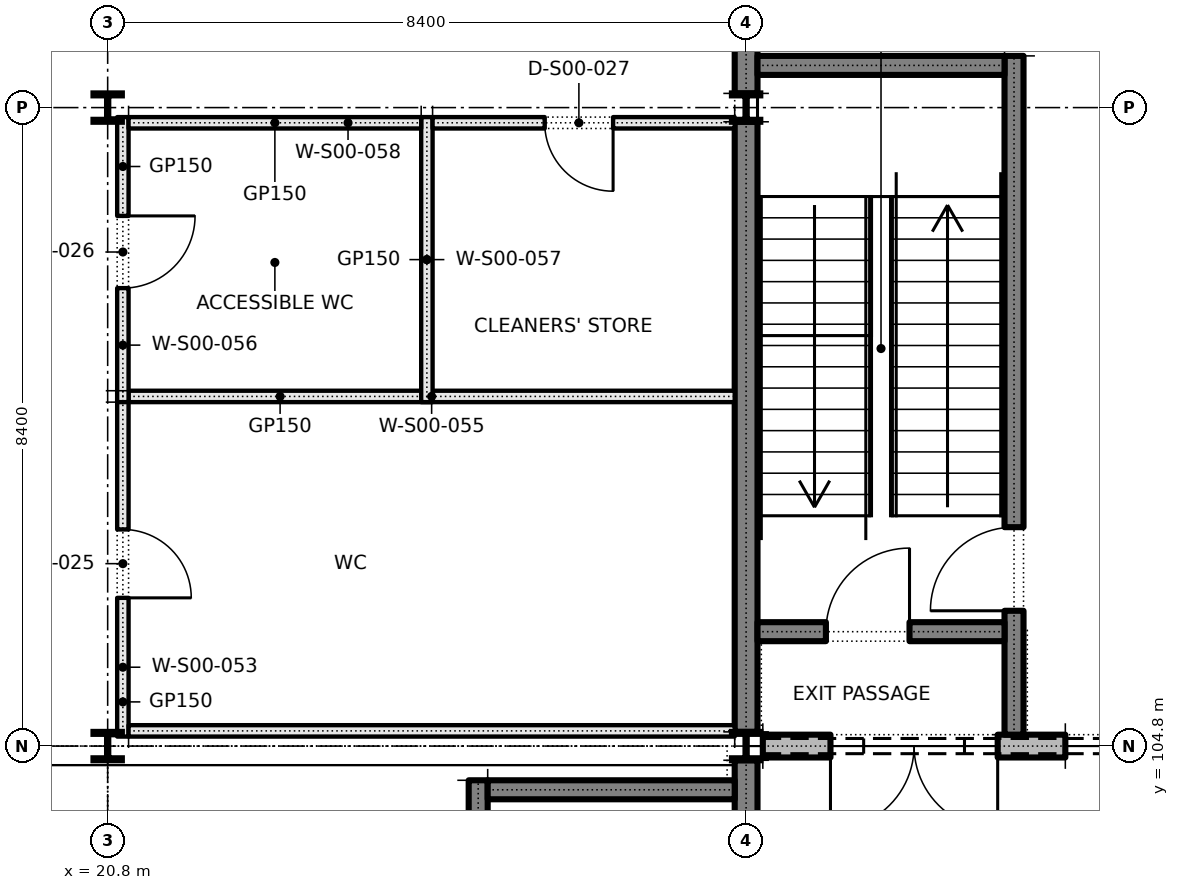
"""IFC4 building model, lengths in metres.
Left out: names, types, materials, properties, quantities, classifications, styles, units other than length and angle.
Written with IfcOpenShell. Run it as: python <this file> out.ifc"""

import sys

from ifc_helpers import new_model, si_unit, direction, frame, frame_2d, origin, origin_2d, place, context, subcontext, project, spatial, rectangle, i_section, extrude, element, fill, save


model = new_model("IFC4")
c1 = context("Model", 3, precision=1e-05, world=origin(), true_north=direction((0.0, 1.0)))
c2 = subcontext(c1, "Body", "Model", "MODEL_VIEW")
j1 = project(units=[si_unit("LENGTHUNIT", "METRE"), si_unit("PLANEANGLEUNIT", "RADIAN")], contexts=[c1])
p1 = place(None, origin())
s1 = spatial("IfcSite", under=j1, at=p1, CompositionType="ELEMENT")
p2 = place(p1, origin())
s2 = spatial("IfcBuilding", under=s1, at=p2, CompositionType="ELEMENT")
p3 = place(p2, origin())
s3 = spatial("IfcBuildingStorey", under=s2, at=p3, CompositionType="ELEMENT", Elevation=0.0)
for number, where, z_axis, x_axis in (
    (1, (20.8, 104.8, 0.0), (0.0, 0.0, 1.0), (1.0, 0.0, 0.0)),
    (2, (20.8, 113.2, 0.0), (0.0, 0.0, 1.0), (1.0, 0.0, 0.0)),
    (3, (29.2, 104.8, 0.0), (0.0, 0.0, 1.0), (1.0, 0.0, 0.0)),
    (4, (29.2, 113.2, 0.0), (0.0, 0.0, 1.0), (1.0, 0.0, 0.0)),
):
    element("IfcColumn", number, at=place(p3, frame(where, z_axis=z_axis, x_axis=x_axis)), inside=s3, PredefinedType="COLUMN", context=c2, shape_type="SweptSolid", body=[
        extrude(i_section(OverallWidth=0.373, OverallDepth=0.373, WebThickness=0.016, FlangeThickness=0.026, FilletRadius=0.015, at=origin_2d()), origin(), (0.0, 0.0, 1.0), 5.4),
    ])
p4 = place(p3, frame((29.2, 96.65, 0.0), z_axis=(0.0, 0.0, 1.0), x_axis=(0.0, 1.0, 0.0)))
e5 = element("IfcWall", 5, at=p4, inside=s3, PredefinedType="SOLIDWALL", context=c2, shape_type="SweptSolid", body=[
    extrude(rectangle(XDim=7.963, YDim=0.3, at=frame_2d((3.982, 0.0))), origin(), (0.0, 0.0, 1.0), 5.4),
])
p5 = place(p4, frame((0.55, 0.0, 0.0)))
e6 = element("IfcOpeningElement", 6, at=p5, cuts=e5, PredefinedType="OPENING", context=c2, shape_type="SweptSolid", body=[
    extrude(rectangle(XDim=1.1, YDim=2.1, at=frame_2d((0.55, 1.05))), frame((0.0, 0.16, 0.0), z_axis=(0.0, -1.0, 0.0), x_axis=(1.0, 0.0, 0.0)), (0.0, 0.0, 1.0), 0.32),
])
p6 = place(p3, frame((29.2, 104.987, 0.0), z_axis=(0.0, 0.0, 1.0), x_axis=(0.0, 1.0, 0.0)))
e7 = element("IfcWall", 7, at=p6, inside=s3, PredefinedType="SOLIDWALL", context=c2, shape_type="SweptSolid", body=[
    extrude(rectangle(XDim=8.027, YDim=0.3, at=frame_2d((4.013, 0.0))), origin(), (0.0, 0.0, 1.0), 5.4),
])
p7 = place(p3, frame((29.2, 113.387, 0.0), z_axis=(0.0, 0.0, 1.0), x_axis=(0.0, 1.0, 0.0)))
e8 = element("IfcWall", 8, at=p7, inside=s3, PredefinedType="SOLIDWALL", context=c2, shape_type="SweptSolid", body=[
    extrude(rectangle(XDim=8.027, YDim=0.3, at=frame_2d((4.013, 0.0))), origin(), (0.0, 0.0, 1.0), 5.4),
])
p8 = place(p7, frame((3.113, 0.0, 0.0)))
e9 = element("IfcOpeningElement", 9, at=p8, cuts=e8, PredefinedType="OPENING", context=c2, shape_type="SweptSolid", body=[
    extrude(rectangle(XDim=1.8, YDim=2.4, at=frame_2d((0.9, 1.2))), frame((0.0, 0.16, 0.0), z_axis=(0.0, -1.0, 0.0), x_axis=(1.0, 0.0, 0.0)), (0.0, 0.0, 1.0), 0.32),
])
p9 = place(p3, frame((29.42, 104.8, 0.0), z_axis=(0.0, 0.0, 1.0), x_axis=(1.0, 0.0, 0.0)))
e10 = element("IfcWall", 10, at=p9, inside=s3, PredefinedType="SOLIDWALL", context=c2, shape_type="SweptSolid", body=[
    extrude(rectangle(XDim=3.98, YDim=0.3, at=frame_2d((1.99, 0.0))), origin(), (0.0, 0.0, 1.0), 2.7),
])
p10 = place(p9, frame((0.89, 0.0, 0.0)))
e11 = element("IfcOpeningElement", 11, at=p10, cuts=e10, PredefinedType="OPENING", context=c2, shape_type="SweptSolid", body=[
    extrude(rectangle(XDim=2.2, YDim=2.4, at=frame_2d((1.1, 1.2))), frame((0.0, 0.16, 0.0), z_axis=(0.0, -1.0, 0.0), x_axis=(1.0, 0.0, 0.0)), (0.0, 0.0, 1.0), 0.32),
])
p11 = place(p3, frame((25.675, 96.65, 0.0), z_axis=(0.0, 0.0, 1.0), x_axis=(0.0, 1.0, 0.0)))
e12 = element("IfcWall", 12, at=p11, inside=s3, PredefinedType="SHEAR", context=c2, shape_type="SweptSolid", body=[
    extrude(rectangle(XDim=7.7, YDim=0.25, at=frame_2d((3.85, 0.0))), origin(), (0.0, 0.0, 1.0), 5.4),
])
p12 = place(p11, frame((0.4, 0.0, 0.0)))
e13 = element("IfcOpeningElement", 13, at=p12, cuts=e12, PredefinedType="OPENING", context=c2, shape_type="SweptSolid", body=[
    extrude(rectangle(XDim=1.1, YDim=2.1, at=frame_2d((0.55, 1.05))), frame((0.0, 0.135, 0.0), z_axis=(0.0, -1.0, 0.0), x_axis=(1.0, 0.0, 0.0)), (0.0, 0.0, 1.0), 0.27),
])
p13 = place(p3, frame((25.8, 104.225, 0.0), z_axis=(0.0, 0.0, 1.0), x_axis=(1.0, 0.0, 0.0)))
e14 = element("IfcWall", 14, at=p13, inside=s3, PredefinedType="SHEAR", context=c2, shape_type="SweptSolid", body=[
    extrude(rectangle(XDim=3.25, YDim=0.25, at=frame_2d((1.625, 0.0))), origin(), (0.0, 0.0, 1.0), 5.4),
])
p14 = place(p3, frame((21.0, 104.925, 0.0), z_axis=(0.0, 0.0, 1.0), x_axis=(0.0, 1.0, 0.0)))
e15 = element("IfcWall", 15, at=p14, inside=s3, PredefinedType="PARTITIONING", context=c2, shape_type="SweptSolid", body=[
    extrude(rectangle(XDim=4.55, YDim=0.15, at=frame_2d((2.275, 0.0))), origin(), (0.0, 0.0, 1.0), 5.4),
])
p15 = place(p14, frame((1.825, 0.0, 0.0)))
e16 = element("IfcOpeningElement", 16, at=p15, cuts=e15, PredefinedType="OPENING", context=c2, shape_type="SweptSolid", body=[
    extrude(rectangle(XDim=0.9, YDim=2.1, at=frame_2d((0.45, 1.05))), frame((0.0, 0.085, 0.0), z_axis=(0.0, -1.0, 0.0), x_axis=(1.0, 0.0, 0.0)), (0.0, 0.0, 1.0), 0.17),
])
for number, where, z_axis, x_axis in (
    (17, (21.075, 105.0, 0.0), (0.0, 0.0, 1.0), (1.0, 0.0, 0.0)),
    (18, (21.075, 109.4, 0.0), (0.0, 0.0, 1.0), (1.0, 0.0, 0.0)),
):
    element("IfcWall", number, at=place(p3, frame(where, z_axis=z_axis, x_axis=x_axis)), inside=s3, PredefinedType="PARTITIONING", context=c2, shape_type="SweptSolid", body=[
        extrude(rectangle(XDim=7.975, YDim=0.15, at=frame_2d((3.988, 0.0))), origin(), (0.0, 0.0, 1.0), 5.4),
    ])
p16 = place(p3, frame((21.0, 109.325, 0.0), z_axis=(0.0, 0.0, 1.0), x_axis=(0.0, 1.0, 0.0)))
e19 = element("IfcWall", 19, at=p16, inside=s3, PredefinedType="PARTITIONING", context=c2, shape_type="SweptSolid", body=[
    extrude(rectangle(XDim=3.75, YDim=0.15, at=frame_2d((1.875, 0.0))), origin(), (0.0, 0.0, 1.0), 5.4),
])
p17 = place(p16, frame((1.5, 0.0, 0.0)))
e20 = element("IfcOpeningElement", 20, at=p17, cuts=e19, PredefinedType="OPENING", context=c2, shape_type="SweptSolid", body=[
    extrude(rectangle(XDim=0.95, YDim=2.1, at=frame_2d((0.475, 1.05))), frame((0.0, 0.085, 0.0), z_axis=(0.0, -1.0, 0.0), x_axis=(1.0, 0.0, 0.0)), (0.0, 0.0, 1.0), 0.17),
])
p18 = place(p3, frame((25.0, 109.325, 0.0), z_axis=(0.0, 0.0, 1.0), x_axis=(0.0, 1.0, 0.0)))
e21 = element("IfcWall", 21, at=p18, inside=s3, PredefinedType="PARTITIONING", context=c2, shape_type="SweptSolid", body=[
    extrude(rectangle(XDim=3.75, YDim=0.15, at=frame_2d((1.875, 0.0))), origin(), (0.0, 0.0, 1.0), 5.4),
])
p19 = place(p3, frame((21.075, 113.0, 0.0), z_axis=(0.0, 0.0, 1.0), x_axis=(1.0, 0.0, 0.0)))
e22 = element("IfcWall", 22, at=p19, inside=s3, PredefinedType="PARTITIONING", context=c2, shape_type="SweptSolid", body=[
    extrude(rectangle(XDim=3.85, YDim=0.15, at=frame_2d((1.925, 0.0))), origin(), (0.0, 0.0, 1.0), 5.4),
])
p20 = place(p3, frame((25.075, 113.0, 0.0), z_axis=(0.0, 0.0, 1.0), x_axis=(1.0, 0.0, 0.0)))
e23 = element("IfcWall", 23, at=p20, inside=s3, PredefinedType="PARTITIONING", context=c2, shape_type="SweptSolid", body=[
    extrude(rectangle(XDim=3.975, YDim=0.15, at=frame_2d((1.988, 0.0))), origin(), (0.0, 0.0, 1.0), 5.4),
])
p21 = place(p20, frame((1.475, 0.0, 0.0)))
e24 = element("IfcOpeningElement", 24, at=p21, cuts=e23, PredefinedType="OPENING", context=c2, shape_type="SweptSolid", body=[
    extrude(rectangle(XDim=0.9, YDim=2.1, at=frame_2d((0.45, 1.05))), frame((0.0, 0.085, 0.0), z_axis=(0.0, -1.0, 0.0), x_axis=(1.0, 0.0, 0.0)), (0.0, 0.0, 1.0), 0.17),
])
p22 = place(p3, frame((32.725, 104.95, 0.0), z_axis=(0.0, 0.0, 1.0), x_axis=(0.0, 1.0, 0.0)))
e25 = element("IfcWall", 25, at=p22, inside=s3, PredefinedType="SHEAR", context=c2, shape_type="SweptSolid", body=[
    extrude(rectangle(XDim=8.93, YDim=0.25, at=frame_2d((4.465, 0.0))), origin(), (0.0, 0.0, 1.0), 5.4),
])
p23 = place(p22, frame((1.63, 0.0, 0.0)))
e26 = element("IfcOpeningElement", 26, at=p23, cuts=e25, PredefinedType="OPENING", context=c2, shape_type="SweptSolid", body=[
    extrude(rectangle(XDim=1.1, YDim=2.1, at=frame_2d((0.55, 1.05))), frame((0.0, 0.135, 0.0), z_axis=(0.0, -1.0, 0.0), x_axis=(1.0, 0.0, 0.0)), (0.0, 0.0, 1.0), 0.27),
])
p24 = place(p3, frame((29.35, 113.755, 0.0), z_axis=(0.0, 0.0, 1.0), x_axis=(1.0, 0.0, 0.0)))
e27 = element("IfcWall", 27, at=p24, inside=s3, PredefinedType="SHEAR", context=c2, shape_type="SweptSolid", body=[
    extrude(rectangle(XDim=3.25, YDim=0.25, at=frame_2d((1.625, 0.0))), origin(), (0.0, 0.0, 1.0), 5.4),
])
p25 = place(p3, frame((29.35, 106.305, 0.0), z_axis=(0.0, 0.0, 1.0), x_axis=(1.0, 0.0, 0.0)))
e28 = element("IfcWall", 28, at=p25, inside=s3, PredefinedType="SHEAR", context=c2, shape_type="SweptSolid", body=[
    extrude(rectangle(XDim=3.25, YDim=0.25, at=frame_2d((1.625, 0.0))), origin(), (0.0, 0.0, 1.0), 5.4),
])
p26 = place(p25, frame((0.9, 0.0, 0.0)))
e29 = element("IfcOpeningElement", 29, at=p26, cuts=e28, PredefinedType="OPENING", context=c2, shape_type="SweptSolid", body=[
    extrude(rectangle(XDim=1.1, YDim=2.1, at=frame_2d((0.55, 1.05))), frame((0.0, 0.135, 0.0), z_axis=(0.0, -1.0, 0.0), x_axis=(1.0, 0.0, 0.0)), (0.0, 0.0, 1.0), 0.27),
])
p27 = place(p3, frame((29.2, 98.32, -0.2), z_axis=(0.0, 0.0, 1.0), x_axis=(0.0, 1.0, 0.0)))
e30 = element("IfcWall", 30, at=p27, inside=s3, PredefinedType="SOLIDWALL", context=c2, shape_type="SweptSolid", body=[
    extrude(rectangle(XDim=6.16, YDim=0.3, at=frame_2d((3.08, 0.0))), origin(), (0.0, 0.0, 1.0), 0.2),
])
p28 = place(p10, frame((2.2, 0.0, 0.0), z_axis=(0.0, 0.0, 1.0), x_axis=(-1.0, 0.0, 0.0)))
e31 = element("IfcDoor", 31, at=p28, inside=s3, OperationType="DOUBLE_DOOR_SINGLE_SWING", PredefinedType="DOOR", context=c2, shape_type="SweptSolid", body=[
    extrude(rectangle(XDim=2.2, YDim=2.4, at=frame_2d((1.1, 1.2))), frame((0.0, 0.025, 0.0), z_axis=(0.0, -1.0, 0.0), x_axis=(1.0, 0.0, 0.0)), (0.0, 0.0, 1.0), 0.05),
])
fill(e11, e31)
p29 = place(p15, frame((0.9, 0.0, 0.0), z_axis=(0.0, 0.0, 1.0), x_axis=(-1.0, 0.0, 0.0)))
e32 = element("IfcDoor", 32, at=p29, inside=s3, OperationType="SINGLE_SWING_RIGHT", PredefinedType="DOOR", context=c2, shape_type="SweptSolid", body=[
    extrude(rectangle(XDim=0.9, YDim=2.1, at=frame_2d((0.45, 1.05))), frame((0.0, 0.025, 0.0), z_axis=(0.0, -1.0, 0.0), x_axis=(1.0, 0.0, 0.0)), (0.0, 0.0, 1.0), 0.05),
])
fill(e16, e32)
p30 = place(p17, frame((0.95, 0.0, 0.0), z_axis=(0.0, 0.0, 1.0), x_axis=(-1.0, 0.0, 0.0)))
e33 = element("IfcDoor", 33, at=p30, inside=s3, OperationType="SINGLE_SWING_LEFT", PredefinedType="DOOR", context=c2, shape_type="SweptSolid", body=[
    extrude(rectangle(XDim=0.95, YDim=2.1, at=frame_2d((0.475, 1.05))), frame((0.0, 0.025, 0.0), z_axis=(0.0, -1.0, 0.0), x_axis=(1.0, 0.0, 0.0)), (0.0, 0.0, 1.0), 0.05),
])
fill(e20, e33)
p31 = place(p21, frame((0.9, 0.0, 0.0), z_axis=(0.0, 0.0, 1.0), x_axis=(-1.0, 0.0, 0.0)))
e34 = element("IfcDoor", 34, at=p31, inside=s3, OperationType="SINGLE_SWING_LEFT", PredefinedType="DOOR", context=c2, shape_type="SweptSolid", body=[
    extrude(rectangle(XDim=0.9, YDim=2.1, at=frame_2d((0.45, 1.05))), frame((0.0, 0.025, 0.0), z_axis=(0.0, -1.0, 0.0), x_axis=(1.0, 0.0, 0.0)), (0.0, 0.0, 1.0), 0.05),
])
fill(e24, e34)
p32 = place(p23, origin())
e35 = element("IfcDoor", 35, at=p32, inside=s3, OperationType="SINGLE_SWING_LEFT", PredefinedType="DOOR", context=c2, shape_type="SweptSolid", body=[
    extrude(rectangle(XDim=1.1, YDim=2.1, at=frame_2d((0.55, 1.05))), frame((0.0, 0.025, 0.0), z_axis=(0.0, -1.0, 0.0), x_axis=(1.0, 0.0, 0.0)), (0.0, 0.0, 1.0), 0.05),
])
fill(e26, e35)
p33 = place(p26, origin())
e36 = element("IfcDoor", 36, at=p33, inside=s3, OperationType="SINGLE_SWING_RIGHT", PredefinedType="DOOR", context=c2, shape_type="SweptSolid", body=[
    extrude(rectangle(XDim=1.1, YDim=2.1, at=frame_2d((0.55, 1.05))), frame((0.0, 0.025, 0.0), z_axis=(0.0, -1.0, 0.0), x_axis=(1.0, 0.0, 0.0)), (0.0, 0.0, 1.0), 0.05),
])
fill(e29, e36)
save(model, sys.argv[1])
